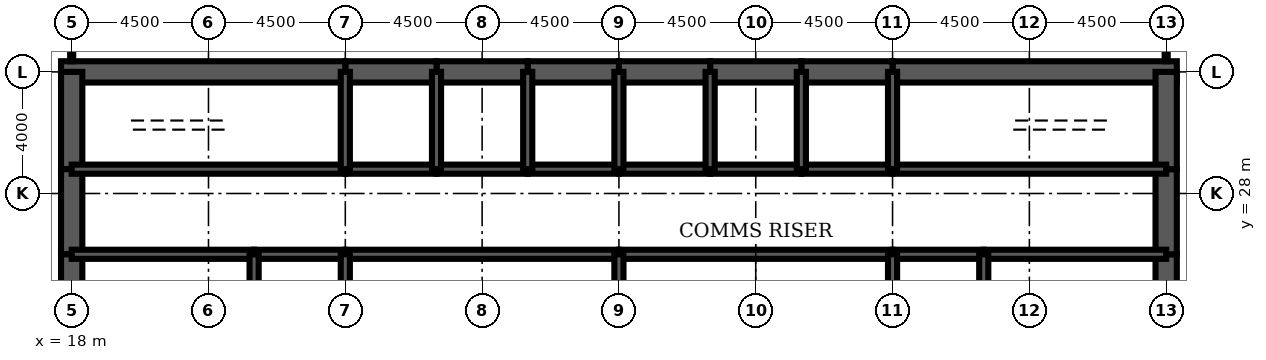
"""IFC4 building model, lengths in metres.
Left out: names, types, materials, properties, quantities, classifications, styles, units other than length and angle.
Written with IfcOpenShell. Run it as: python <this file> out.ifc"""

import sys

from ifc_helpers import new_model, si_unit, direction, frame, frame_2d, origin, place, context, subcontext, project, spatial, rectangle, extrude, element, fill, save


model = new_model("IFC4")
c1 = context("Model", 3, precision=1e-05, world=origin(), true_north=direction((0.0, 1.0)))
c2 = subcontext(c1, "Body", "Model", "MODEL_VIEW")
j1 = project(units=[si_unit("LENGTHUNIT", "METRE"), si_unit("PLANEANGLEUNIT", "RADIAN")], contexts=[c1])
p1 = place(None, origin())
s1 = spatial("IfcSite", under=j1, at=p1, CompositionType="ELEMENT")
p2 = place(p1, origin())
s2 = spatial("IfcBuilding", under=s1, at=p2, CompositionType="ELEMENT")
p3 = place(p2, frame((0.0, 0.0, 308.9)))
s3 = spatial("IfcBuildingStorey", under=s2, at=p3, CompositionType="ELEMENT", Elevation=308.9)
p4 = place(p3, frame((54.35, 32.0, 0.0), z_axis=(0.0, 0.0, 1.0), x_axis=(-1.0, 0.0, 0.0)))
e1 = element("IfcWall", 1, at=p4, inside=s3, PredefinedType="SHEAR", context=c2, shape_type="SweptSolid", body=[
    extrude(rectangle(XDim=9.35, YDim=0.7, at=frame_2d((4.675, 0.0))), origin(), (0.0, 0.0, 1.0), 4.2),
])
for number, where, z_axis, x_axis in (
    (2, (45.0, 32.0, 0.0), (0.0, 0.0, 1.0), (-1.0, 0.0, 0.0)),
    (3, (42.0, 32.0, 0.0), (0.0, 0.0, 1.0), (-1.0, 0.0, 0.0)),
    (4, (39.0, 32.0, 0.0), (0.0, 0.0, 1.0), (-1.0, 0.0, 0.0)),
    (5, (36.0, 32.0, 0.0), (0.0, 0.0, 1.0), (-1.0, 0.0, 0.0)),
    (6, (33.0, 32.0, 0.0), (0.0, 0.0, 1.0), (-1.0, 0.0, 0.0)),
    (7, (30.0, 32.0, 0.0), (0.0, 0.0, 1.0), (-1.0, 0.0, 0.0)),
):
    element("IfcWall", number, at=place(p3, frame(where, z_axis=z_axis, x_axis=x_axis)), inside=s3, PredefinedType="SHEAR", context=c2, shape_type="SweptSolid", body=[
        extrude(rectangle(XDim=3.0, YDim=0.7, at=frame_2d((1.5, 0.0))), origin(), (0.0, 0.0, 1.0), 4.2),
    ])
p5 = place(p3, frame((27.0, 32.0, 0.0), z_axis=(0.0, 0.0, 1.0), x_axis=(-1.0, 0.0, 0.0)))
e8 = element("IfcWall", 8, at=p5, inside=s3, PredefinedType="SHEAR", context=c2, shape_type="SweptSolid", body=[
    extrude(rectangle(XDim=9.35, YDim=0.7, at=frame_2d((4.675, 0.0))), origin(), (0.0, 0.0, 1.0), 4.2),
])
p6 = place(p3, frame((18.0, 32.0, 0.0), z_axis=(0.0, 0.0, 1.0), x_axis=(0.0, -1.0, 0.0)))
e9 = element("IfcWall", 9, at=p6, inside=s3, PredefinedType="SHEAR", context=c2, shape_type="SweptSolid", body=[
    extrude(rectangle(XDim=3.2, YDim=0.7, at=frame_2d((1.6, 0.0))), origin(), (0.0, 0.0, 1.0), 4.2),
])
p7 = place(p3, frame((18.0, 28.8, 0.0), z_axis=(0.0, 0.0, 1.0), x_axis=(0.0, -1.0, 0.0)))
e10 = element("IfcWall", 10, at=p7, inside=s3, PredefinedType="SHEAR", context=c2, shape_type="SweptSolid", body=[
    extrude(rectangle(XDim=2.8, YDim=0.7, at=frame_2d((1.4, 0.0))), origin(), (0.0, 0.0, 1.0), 4.2),
])
p8 = place(p7, frame((0.4, 0.0, 0.0)))
e11 = element("IfcOpeningElement", 11, at=p8, cuts=e10, PredefinedType="OPENING", context=c2, shape_type="SweptSolid", body=[
    extrude(rectangle(XDim=1.8, YDim=2.1, at=frame_2d((0.9, 1.05))), frame((0.0, 0.36, 0.0), z_axis=(0.0, -1.0, 0.0), x_axis=(1.0, 0.0, 0.0)), (0.0, 0.0, 1.0), 0.72),
])
for number, where, z_axis, x_axis in (
    (12, (18.0, 26.0, 0.0), (0.0, 0.0, 1.0), (0.0, -1.0, 0.0)),
    (13, (54.0, 22.0, 0.0), (0.0, 0.0, 1.0), (0.0, 1.0, 0.0)),
):
    element("IfcWall", number, at=place(p3, frame(where, z_axis=z_axis, x_axis=x_axis)), inside=s3, PredefinedType="SHEAR", context=c2, shape_type="SweptSolid", body=[
        extrude(rectangle(XDim=4.0, YDim=0.7, at=frame_2d((2.0, 0.0))), origin(), (0.0, 0.0, 1.0), 4.2),
    ])
p9 = place(p3, frame((54.0, 26.0, 0.0), z_axis=(0.0, 0.0, 1.0), x_axis=(0.0, 1.0, 0.0)))
e14 = element("IfcWall", 14, at=p9, inside=s3, PredefinedType="SHEAR", context=c2, shape_type="SweptSolid", body=[
    extrude(rectangle(XDim=2.8, YDim=0.7, at=frame_2d((1.4, 0.0))), origin(), (0.0, 0.0, 1.0), 4.2),
])
p10 = place(p9, frame((0.6, 0.0, 0.0)))
e15 = element("IfcOpeningElement", 15, at=p10, cuts=e14, PredefinedType="OPENING", context=c2, shape_type="SweptSolid", body=[
    extrude(rectangle(XDim=1.8, YDim=2.1, at=frame_2d((0.9, 1.05))), frame((0.0, 0.36, 0.0), z_axis=(0.0, -1.0, 0.0), x_axis=(1.0, 0.0, 0.0)), (0.0, 0.0, 1.0), 0.72),
])
p11 = place(p3, frame((54.0, 28.8, 0.0), z_axis=(0.0, 0.0, 1.0), x_axis=(0.0, 1.0, 0.0)))
e16 = element("IfcWall", 16, at=p11, inside=s3, PredefinedType="SHEAR", context=c2, shape_type="SweptSolid", body=[
    extrude(rectangle(XDim=3.2, YDim=0.7, at=frame_2d((1.6, 0.0))), origin(), (0.0, 0.0, 1.0), 4.2),
])
p12 = place(p3, frame((18.0, 28.8, 0.0), z_axis=(0.0, 0.0, 1.0), x_axis=(1.0, 0.0, 0.0)))
e17 = element("IfcWall", 17, at=p12, inside=s3, PredefinedType="SOLIDWALL", context=c2, shape_type="SweptSolid", body=[
    extrude(rectangle(XDim=9.0, YDim=0.3, at=frame_2d((4.5, 0.0))), origin(), (0.0, 0.0, 1.0), 4.2),
])
p13 = place(p12, frame((0.65, 0.0, 0.0)))
e18 = element("IfcOpeningElement", 18, at=p13, cuts=e17, PredefinedType="OPENING", context=c2, shape_type="SweptSolid", body=[
    extrude(rectangle(XDim=1.0, YDim=2.1, at=frame_2d((0.5, 1.05))), frame((0.0, 0.16, 0.0), z_axis=(0.0, -1.0, 0.0), x_axis=(1.0, 0.0, 0.0)), (0.0, 0.0, 1.0), 0.32),
])
p14 = place(p3, frame((27.0, 28.8, 0.0), z_axis=(0.0, 0.0, 1.0), x_axis=(1.0, 0.0, 0.0)))
e19 = element("IfcWall", 19, at=p14, inside=s3, PredefinedType="SOLIDWALL", context=c2, shape_type="SweptSolid", body=[
    extrude(rectangle(XDim=3.0, YDim=0.3, at=frame_2d((1.5, 0.0))), origin(), (0.0, 0.0, 1.0), 4.2),
])
p15 = place(p14, frame((0.95, 0.0, 0.0)))
e20 = element("IfcOpeningElement", 20, at=p15, cuts=e19, PredefinedType="OPENING", context=c2, shape_type="SweptSolid", body=[
    extrude(rectangle(XDim=1.1, YDim=2.2, at=frame_2d((0.55, 1.1))), frame((0.0, 0.16, 0.0), z_axis=(0.0, -1.0, 0.0), x_axis=(1.0, 0.0, 0.0)), (0.0, 0.0, 1.0), 0.32),
])
p16 = place(p3, frame((30.0, 28.8, 0.0), z_axis=(0.0, 0.0, 1.0), x_axis=(1.0, 0.0, 0.0)))
e21 = element("IfcWall", 21, at=p16, inside=s3, PredefinedType="SOLIDWALL", context=c2, shape_type="SweptSolid", body=[
    extrude(rectangle(XDim=3.0, YDim=0.3, at=frame_2d((1.5, 0.0))), origin(), (0.0, 0.0, 1.0), 4.2),
])
p17 = place(p16, frame((0.95, 0.0, 0.0)))
e22 = element("IfcOpeningElement", 22, at=p17, cuts=e21, PredefinedType="OPENING", context=c2, shape_type="SweptSolid", body=[
    extrude(rectangle(XDim=1.1, YDim=2.2, at=frame_2d((0.55, 1.1))), frame((0.0, 0.16, 0.0), z_axis=(0.0, -1.0, 0.0), x_axis=(1.0, 0.0, 0.0)), (0.0, 0.0, 1.0), 0.32),
])
p18 = place(p3, frame((33.0, 28.8, 0.0), z_axis=(0.0, 0.0, 1.0), x_axis=(1.0, 0.0, 0.0)))
e23 = element("IfcWall", 23, at=p18, inside=s3, PredefinedType="SOLIDWALL", context=c2, shape_type="SweptSolid", body=[
    extrude(rectangle(XDim=3.0, YDim=0.3, at=frame_2d((1.5, 0.0))), origin(), (0.0, 0.0, 1.0), 4.2),
])
p19 = place(p18, frame((0.95, 0.0, 0.0)))
e24 = element("IfcOpeningElement", 24, at=p19, cuts=e23, PredefinedType="OPENING", context=c2, shape_type="SweptSolid", body=[
    extrude(rectangle(XDim=1.1, YDim=2.2, at=frame_2d((0.55, 1.1))), frame((0.0, 0.16, 0.0), z_axis=(0.0, -1.0, 0.0), x_axis=(1.0, 0.0, 0.0)), (0.0, 0.0, 1.0), 0.32),
])
p20 = place(p3, frame((36.0, 28.8, 0.0), z_axis=(0.0, 0.0, 1.0), x_axis=(1.0, 0.0, 0.0)))
e25 = element("IfcWall", 25, at=p20, inside=s3, PredefinedType="SOLIDWALL", context=c2, shape_type="SweptSolid", body=[
    extrude(rectangle(XDim=3.0, YDim=0.3, at=frame_2d((1.5, 0.0))), origin(), (0.0, 0.0, 1.0), 4.2),
])
p21 = place(p20, frame((1.0, 0.0, 0.0)))
e26 = element("IfcOpeningElement", 26, at=p21, cuts=e25, PredefinedType="OPENING", context=c2, shape_type="SweptSolid", body=[
    extrude(rectangle(XDim=1.0, YDim=2.1, at=frame_2d((0.5, 1.05))), frame((0.0, 0.16, 0.0), z_axis=(0.0, -1.0, 0.0), x_axis=(1.0, 0.0, 0.0)), (0.0, 0.0, 1.0), 0.32),
])
p22 = place(p3, frame((39.0, 28.8, 0.0), z_axis=(0.0, 0.0, 1.0), x_axis=(1.0, 0.0, 0.0)))
e27 = element("IfcWall", 27, at=p22, inside=s3, PredefinedType="SOLIDWALL", context=c2, shape_type="SweptSolid", body=[
    extrude(rectangle(XDim=3.0, YDim=0.3, at=frame_2d((1.5, 0.0))), origin(), (0.0, 0.0, 1.0), 4.2),
])
p23 = place(p22, frame((1.0, 0.0, 0.0)))
e28 = element("IfcOpeningElement", 28, at=p23, cuts=e27, PredefinedType="OPENING", context=c2, shape_type="SweptSolid", body=[
    extrude(rectangle(XDim=1.0, YDim=2.1, at=frame_2d((0.5, 1.05))), frame((0.0, 0.16, 0.0), z_axis=(0.0, -1.0, 0.0), x_axis=(1.0, 0.0, 0.0)), (0.0, 0.0, 1.0), 0.32),
])
p24 = place(p3, frame((42.0, 28.8, 0.0), z_axis=(0.0, 0.0, 1.0), x_axis=(1.0, 0.0, 0.0)))
e29 = element("IfcWall", 29, at=p24, inside=s3, PredefinedType="SOLIDWALL", context=c2, shape_type="SweptSolid", body=[
    extrude(rectangle(XDim=3.0, YDim=0.3, at=frame_2d((1.5, 0.0))), origin(), (0.0, 0.0, 1.0), 4.2),
])
p25 = place(p24, frame((0.95, 0.0, 0.0)))
e30 = element("IfcOpeningElement", 30, at=p25, cuts=e29, PredefinedType="OPENING", context=c2, shape_type="SweptSolid", body=[
    extrude(rectangle(XDim=1.1, YDim=2.2, at=frame_2d((0.55, 1.1))), frame((0.0, 0.16, 0.0), z_axis=(0.0, -1.0, 0.0), x_axis=(1.0, 0.0, 0.0)), (0.0, 0.0, 1.0), 0.32),
])
p26 = place(p3, frame((45.0, 28.8, 0.0), z_axis=(0.0, 0.0, 1.0), x_axis=(1.0, 0.0, 0.0)))
e31 = element("IfcWall", 31, at=p26, inside=s3, PredefinedType="SOLIDWALL", context=c2, shape_type="SweptSolid", body=[
    extrude(rectangle(XDim=9.0, YDim=0.3, at=frame_2d((4.5, 0.0))), origin(), (0.0, 0.0, 1.0), 4.2),
])
p27 = place(p26, frame((7.35, 0.0, 0.0)))
e32 = element("IfcOpeningElement", 32, at=p27, cuts=e31, PredefinedType="OPENING", context=c2, shape_type="SweptSolid", body=[
    extrude(rectangle(XDim=1.0, YDim=2.1, at=frame_2d((0.5, 1.05))), frame((0.0, 0.16, 0.0), z_axis=(0.0, -1.0, 0.0), x_axis=(1.0, 0.0, 0.0)), (0.0, 0.0, 1.0), 0.32),
])
p28 = place(p3, frame((18.0, 26.0, 0.0), z_axis=(0.0, 0.0, 1.0), x_axis=(1.0, 0.0, 0.0)))
e33 = element("IfcWall", 33, at=p28, inside=s3, PredefinedType="SOLIDWALL", context=c2, shape_type="SweptSolid", body=[
    extrude(rectangle(XDim=6.0, YDim=0.3, at=frame_2d((3.0, 0.0))), origin(), (0.0, 0.0, 1.0), 4.2),
])
p29 = place(p3, frame((24.0, 26.0, 0.0), z_axis=(0.0, 0.0, 1.0), x_axis=(1.0, 0.0, 0.0)))
e34 = element("IfcWall", 34, at=p29, inside=s3, PredefinedType="SOLIDWALL", context=c2, shape_type="SweptSolid", body=[
    extrude(rectangle(XDim=3.0, YDim=0.3, at=frame_2d((1.5, 0.0))), origin(), (0.0, 0.0, 1.0), 4.2),
])
for number, where, z_axis, x_axis in (
    (35, (27.0, 26.0, 0.0), (0.0, 0.0, 1.0), (1.0, 0.0, 0.0)),
    (36, (36.0, 26.0, 0.0), (0.0, 0.0, 1.0), (1.0, 0.0, 0.0)),
):
    element("IfcWall", number, at=place(p3, frame(where, z_axis=z_axis, x_axis=x_axis)), inside=s3, PredefinedType="SOLIDWALL", context=c2, shape_type="SweptSolid", body=[
        extrude(rectangle(XDim=9.0, YDim=0.3, at=frame_2d((4.5, 0.0))), origin(), (0.0, 0.0, 1.0), 4.2),
    ])
p30 = place(p3, frame((45.0, 26.0, 0.0), z_axis=(0.0, 0.0, 1.0), x_axis=(1.0, 0.0, 0.0)))
e37 = element("IfcWall", 37, at=p30, inside=s3, PredefinedType="SOLIDWALL", context=c2, shape_type="SweptSolid", body=[
    extrude(rectangle(XDim=3.0, YDim=0.3, at=frame_2d((1.5, 0.0))), origin(), (0.0, 0.0, 1.0), 4.2),
])
p31 = place(p3, frame((48.0, 26.0, 0.0), z_axis=(0.0, 0.0, 1.0), x_axis=(1.0, 0.0, 0.0)))
e38 = element("IfcWall", 38, at=p31, inside=s3, PredefinedType="SOLIDWALL", context=c2, shape_type="SweptSolid", body=[
    extrude(rectangle(XDim=6.0, YDim=0.3, at=frame_2d((3.0, 0.0))), origin(), (0.0, 0.0, 1.0), 4.2),
])
for number, where, z_axis, x_axis in (
    (39, (27.0, 28.8, 0.0), (0.0, 0.0, 1.0), (0.0, 1.0, 0.0)),
    (40, (30.0, 28.8, 0.0), (0.0, 0.0, 1.0), (0.0, 1.0, 0.0)),
    (41, (33.0, 28.8, 0.0), (0.0, 0.0, 1.0), (0.0, 1.0, 0.0)),
    (42, (36.0, 28.8, 0.0), (0.0, 0.0, 1.0), (0.0, 1.0, 0.0)),
    (43, (39.0, 28.8, 0.0), (0.0, 0.0, 1.0), (0.0, 1.0, 0.0)),
    (44, (42.0, 28.8, 0.0), (0.0, 0.0, 1.0), (0.0, 1.0, 0.0)),
    (45, (45.0, 28.8, 0.0), (0.0, 0.0, 1.0), (0.0, 1.0, 0.0)),
):
    element("IfcWall", number, at=place(p3, frame(where, z_axis=z_axis, x_axis=x_axis)), inside=s3, PredefinedType="SOLIDWALL", context=c2, shape_type="SweptSolid", body=[
        extrude(rectangle(XDim=3.2, YDim=0.3, at=frame_2d((1.6, 0.0))), origin(), (0.0, 0.0, 1.0), 4.2),
    ])
for number, where, z_axis, x_axis in (
    (46, (24.0, 22.0, 0.0), (0.0, 0.0, 1.0), (0.0, 1.0, 0.0)),
    (47, (27.0, 22.0, 0.0), (0.0, 0.0, 1.0), (0.0, 1.0, 0.0)),
    (48, (36.0, 22.0, 0.0), (0.0, 0.0, 1.0), (0.0, 1.0, 0.0)),
    (49, (45.0, 22.0, 0.0), (0.0, 0.0, 1.0), (0.0, 1.0, 0.0)),
    (50, (48.0, 22.0, 0.0), (0.0, 0.0, 1.0), (0.0, 1.0, 0.0)),
):
    element("IfcWall", number, at=place(p3, frame(where, z_axis=z_axis, x_axis=x_axis)), inside=s3, PredefinedType="SOLIDWALL", context=c2, shape_type="SweptSolid", body=[
        extrude(rectangle(XDim=4.0, YDim=0.3, at=frame_2d((2.0, 0.0))), origin(), (0.0, 0.0, 1.0), 4.2),
    ])
p32 = place(p3, frame((38.0, 22.15, 0.0), z_axis=(0.0, 0.0, 1.0), x_axis=(0.0, 1.0, 0.0)))
e51 = element("IfcWall", 51, at=p32, inside=s3, PredefinedType="PARTITIONING", context=c2, shape_type="SweptSolid", body=[
    extrude(rectangle(XDim=3.7, YDim=0.15, at=frame_2d((1.85, 0.0))), origin(), (0.0, 0.0, 1.0), 3.0),
])
p33 = place(p32, frame((2.2, 0.0, 0.0)))
e52 = element("IfcOpeningElement", 52, at=p33, cuts=e51, PredefinedType="OPENING", context=c2, shape_type="SweptSolid", body=[
    extrude(rectangle(XDim=1.0, YDim=2.1, at=frame_2d((0.5, 1.05))), frame((0.0, 0.085, 0.0), z_axis=(0.0, -1.0, 0.0), x_axis=(1.0, 0.0, 0.0)), (0.0, 0.0, 1.0), 0.17),
])
p34 = place(p3, frame((19.925, 22.15, 0.0), z_axis=(0.0, 0.0, 1.0), x_axis=(0.0, 1.0, 0.0)))
e53 = element("IfcWall", 53, at=p34, inside=s3, PredefinedType="PARTITIONING", context=c2, shape_type="SweptSolid", body=[
    extrude(rectangle(XDim=3.7, YDim=0.15, at=frame_2d((1.85, 0.0))), origin(), (0.0, 0.0, 1.0), 3.0),
])
p35 = place(p3, frame((18.0, 32.35, 0.0), z_axis=(0.0, 0.0, 1.0), x_axis=(0.0, 1.0, 0.0)))
e54 = element("IfcWall", 54, at=p35, inside=s3, PredefinedType="PARTITIONING", context=c2, shape_type="SweptSolid", body=[
    extrude(rectangle(XDim=4.2, YDim=0.1, at=frame_2d((2.1, 0.0))), origin(), (0.0, 0.0, 1.0), 3.0),
])
p36 = place(p35, frame((1.3, 0.0, 0.0)))
e55 = element("IfcOpeningElement", 55, at=p36, cuts=e54, PredefinedType="OPENING", context=c2, shape_type="SweptSolid", body=[
    extrude(rectangle(XDim=1.6, YDim=2.1, at=frame_2d((0.8, 1.05))), frame((0.0, 0.06, 0.0), z_axis=(0.0, -1.0, 0.0), x_axis=(1.0, 0.0, 0.0)), (0.0, 0.0, 1.0), 0.12),
])
p37 = place(p3, frame((54.0, 32.35, 0.0), z_axis=(0.0, 0.0, 1.0), x_axis=(0.0, 1.0, 0.0)))
e56 = element("IfcWall", 56, at=p37, inside=s3, PredefinedType="PARTITIONING", context=c2, shape_type="SweptSolid", body=[
    extrude(rectangle(XDim=5.7, YDim=0.1, at=frame_2d((2.85, 0.0))), origin(), (0.0, 0.0, 1.0), 3.0),
])
p38 = place(p37, frame((2.05, 0.0, 0.0)))
e57 = element("IfcOpeningElement", 57, at=p38, cuts=e56, PredefinedType="OPENING", context=c2, shape_type="SweptSolid", body=[
    extrude(rectangle(XDim=1.6, YDim=2.1, at=frame_2d((0.8, 1.05))), frame((0.0, 0.06, 0.0), z_axis=(0.0, -1.0, 0.0), x_axis=(1.0, 0.0, 0.0)), (0.0, 0.0, 1.0), 0.12),
])
p39 = place(p33, origin())
e58 = element("IfcDoor", 58, at=p39, inside=s3, OperationType="SINGLE_SWING_RIGHT", PredefinedType="DOOR", context=c2, shape_type="SweptSolid", body=[
    extrude(rectangle(XDim=1.0, YDim=2.1, at=frame_2d((0.5, 1.05))), frame((0.0, 0.025, 0.0), z_axis=(0.0, -1.0, 0.0), x_axis=(1.0, 0.0, 0.0)), (0.0, 0.0, 1.0), 0.05),
])
fill(e52, e58)
p40 = place(p25, origin())
e59 = element("IfcDoor", 59, at=p40, inside=s3, OperationType="DOUBLE_DOOR_SLIDING", PredefinedType="USERDEFINED", context=c2, shape_type="SweptSolid", body=[
    extrude(rectangle(XDim=1.1, YDim=2.2, at=frame_2d((0.55, 1.1))), frame((0.0, 0.025, 0.0), z_axis=(0.0, -1.0, 0.0), x_axis=(1.0, 0.0, 0.0)), (0.0, 0.0, 1.0), 0.05),
])
fill(e30, e59)
p41 = place(p15, origin())
e60 = element("IfcDoor", 60, at=p41, inside=s3, OperationType="DOUBLE_DOOR_SLIDING", PredefinedType="USERDEFINED", context=c2, shape_type="SweptSolid", body=[
    extrude(rectangle(XDim=1.1, YDim=2.2, at=frame_2d((0.55, 1.1))), frame((0.0, 0.025, 0.0), z_axis=(0.0, -1.0, 0.0), x_axis=(1.0, 0.0, 0.0)), (0.0, 0.0, 1.0), 0.05),
])
fill(e20, e60)
p42 = place(p17, origin())
e61 = element("IfcDoor", 61, at=p42, inside=s3, OperationType="DOUBLE_DOOR_SLIDING", PredefinedType="USERDEFINED", context=c2, shape_type="SweptSolid", body=[
    extrude(rectangle(XDim=1.1, YDim=2.2, at=frame_2d((0.55, 1.1))), frame((0.0, 0.025, 0.0), z_axis=(0.0, -1.0, 0.0), x_axis=(1.0, 0.0, 0.0)), (0.0, 0.0, 1.0), 0.05),
])
fill(e22, e61)
p43 = place(p19, origin())
e62 = element("IfcDoor", 62, at=p43, inside=s3, OperationType="DOUBLE_DOOR_SLIDING", PredefinedType="USERDEFINED", context=c2, shape_type="SweptSolid", body=[
    extrude(rectangle(XDim=1.1, YDim=2.2, at=frame_2d((0.55, 1.1))), frame((0.0, 0.025, 0.0), z_axis=(0.0, -1.0, 0.0), x_axis=(1.0, 0.0, 0.0)), (0.0, 0.0, 1.0), 0.05),
])
fill(e24, e62)
p44 = place(p13, origin())
e63 = element("IfcDoor", 63, at=p44, inside=s3, OperationType="SINGLE_SWING_LEFT", PredefinedType="DOOR", context=c2, shape_type="SweptSolid", body=[
    extrude(rectangle(XDim=1.0, YDim=2.1, at=frame_2d((0.5, 1.05))), frame((0.0, 0.025, 0.0), z_axis=(0.0, -1.0, 0.0), x_axis=(1.0, 0.0, 0.0)), (0.0, 0.0, 1.0), 0.05),
])
fill(e18, e63)
p45 = place(p27, origin())
e64 = element("IfcDoor", 64, at=p45, inside=s3, OperationType="SINGLE_SWING_RIGHT", PredefinedType="DOOR", context=c2, shape_type="SweptSolid", body=[
    extrude(rectangle(XDim=1.0, YDim=2.1, at=frame_2d((0.5, 1.05))), frame((0.0, 0.025, 0.0), z_axis=(0.0, -1.0, 0.0), x_axis=(1.0, 0.0, 0.0)), (0.0, 0.0, 1.0), 0.05),
])
fill(e32, e64)
p46 = place(p8, origin())
e65 = element("IfcDoor", 65, at=p46, inside=s3, OperationType="SINGLE_SWING_LEFT", PredefinedType="DOOR", context=c2, shape_type="SweptSolid", body=[
    extrude(rectangle(XDim=1.8, YDim=2.1, at=frame_2d((0.9, 1.05))), frame((0.0, 0.35, 0.0), z_axis=(0.0, -1.0, 0.0), x_axis=(1.0, 0.0, 0.0)), (0.0, 0.0, 1.0), 0.699),
])
fill(e11, e65)
p47 = place(p10, origin())
e66 = element("IfcDoor", 66, at=p47, inside=s3, OperationType="SINGLE_SWING_LEFT", PredefinedType="DOOR", context=c2, shape_type="SweptSolid", body=[
    extrude(rectangle(XDim=1.8, YDim=2.1, at=frame_2d((0.9, 1.05))), frame((0.0, 0.35, 0.0), z_axis=(0.0, -1.0, 0.0), x_axis=(1.0, 0.0, 0.0)), (0.0, 0.0, 1.0), 0.699),
])
fill(e15, e66)
p48 = place(p21, origin())
e67 = element("IfcDoor", 67, at=p48, inside=s3, OperationType="SINGLE_SWING_LEFT", PredefinedType="DOOR", context=c2, shape_type="SweptSolid", body=[
    extrude(rectangle(XDim=1.0, YDim=2.1, at=frame_2d((0.5, 1.05))), frame((0.0, 0.025, 0.0), z_axis=(0.0, -1.0, 0.0), x_axis=(1.0, 0.0, 0.0)), (0.0, 0.0, 1.0), 0.05),
])
fill(e26, e67)
p49 = place(p23, origin())
e68 = element("IfcDoor", 68, at=p49, inside=s3, OperationType="SINGLE_SWING_LEFT", PredefinedType="DOOR", context=c2, shape_type="SweptSolid", body=[
    extrude(rectangle(XDim=1.0, YDim=2.1, at=frame_2d((0.5, 1.05))), frame((0.0, 0.025, 0.0), z_axis=(0.0, -1.0, 0.0), x_axis=(1.0, 0.0, 0.0)), (0.0, 0.0, 1.0), 0.05),
])
fill(e28, e68)
save(model, sys.argv[1])
